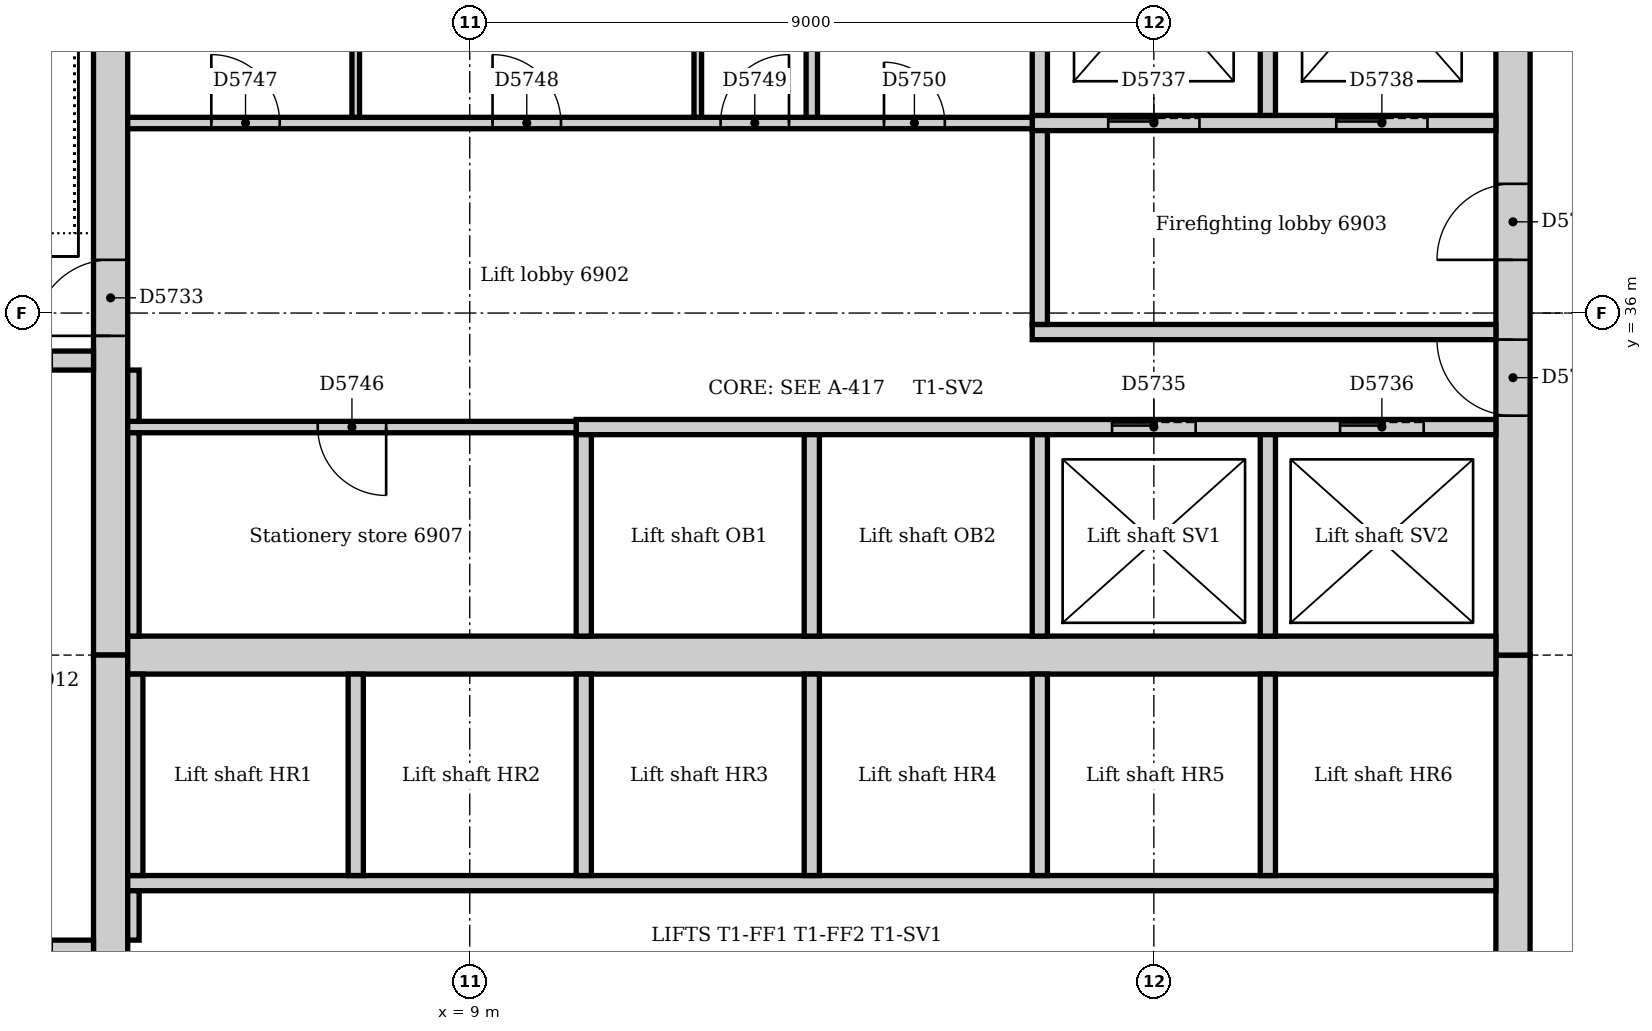
"""IFC4 building model, lengths in metres.
Left out: names, types, materials, properties, quantities, classifications, styles, units other than length and angle.
Written with IfcOpenShell. Run it as: python <this file> out.ifc"""

import sys

from ifc_helpers import new_model, si_unit, direction, frame, frame_2d, origin, place, context, subcontext, project, spatial, rectangle, extrude, element, fill, save


model = new_model("IFC4")
c1 = context("Model", 3, precision=1e-05, world=origin(), true_north=direction((0.0, 1.0)))
c2 = subcontext(c1, "Body", "Model", "MODEL_VIEW")
j1 = project(units=[si_unit("LENGTHUNIT", "METRE"), si_unit("PLANEANGLEUNIT", "RADIAN")], contexts=[c1])
p1 = place(None, origin())
s1 = spatial("IfcSite", under=j1, at=p1, CompositionType="ELEMENT")
p2 = place(p1, origin())
s2 = spatial("IfcBuilding", under=s1, at=p2, CompositionType="ELEMENT")
p3 = place(p2, frame((0.0, 0.0, 291.0)))
s3 = spatial("IfcBuildingStorey", under=s2, at=p3, CompositionType="ELEMENT", Elevation=291.0)
p4 = place(p3, frame((22.725, 21.0, 0.0), z_axis=(0.0, 0.0, 1.0), x_axis=(0.0, 1.0, 0.0)))
e1 = element("IfcWall", 1, at=p4, inside=s3, PredefinedType="SOLIDWALL", context=c2, shape_type="SweptSolid", body=[
    extrude(rectangle(XDim=10.5, YDim=0.45, at=frame_2d((5.25, 0.0))), origin(), (0.0, 0.0, 1.0), 6.55),
])
p5 = place(p4, frame((4.35, 0.0, 0.0)))
e2 = element("IfcOpeningElement", 2, at=p5, cuts=e1, PredefinedType="OPENING", context=c2, shape_type="SweptSolid", body=[
    extrude(rectangle(XDim=1.8, YDim=2.1, at=frame_2d((0.9, 1.05))), frame((0.0, 0.235, 0.0), z_axis=(0.0, -1.0, 0.0), x_axis=(1.0, 0.0, 0.0)), (0.0, 0.0, 1.0), 0.47),
])
p6 = place(p3, frame((22.725, 31.5, 0.0), z_axis=(0.0, 0.0, 1.0), x_axis=(0.0, 1.0, 0.0)))
e3 = element("IfcWall", 3, at=p6, inside=s3, PredefinedType="SOLIDWALL", context=c2, shape_type="SweptSolid", body=[
    extrude(rectangle(XDim=10.5, YDim=0.45, at=frame_2d((5.25, 0.0))), origin(), (0.0, 0.0, 1.0), 6.55),
])
p7 = place(p6, frame((3.15, 0.0, 0.0)))
e4 = element("IfcOpeningElement", 4, at=p7, cuts=e3, PredefinedType="OPENING", context=c2, shape_type="SweptSolid", body=[
    extrude(rectangle(XDim=1.0, YDim=2.1, at=frame_2d((0.5, 1.05))), frame((0.0, 0.235, 0.0), z_axis=(0.0, -1.0, 0.0), x_axis=(1.0, 0.0, 0.0)), (0.0, 0.0, 1.0), 0.47),
])
p8 = place(p6, frame((5.2, 0.0, 0.0)))
e5 = element("IfcOpeningElement", 5, at=p8, cuts=e3, PredefinedType="OPENING", context=c2, shape_type="SweptSolid", body=[
    extrude(rectangle(XDim=1.0, YDim=2.1, at=frame_2d((0.5, 1.05))), frame((0.0, 0.235, 0.0), z_axis=(0.0, -1.0, 0.0), x_axis=(1.0, 0.0, 0.0)), (0.0, 0.0, 1.0), 0.47),
])
p9 = place(p3, frame((4.275, 42.0, 0.0), z_axis=(0.0, 0.0, 1.0), x_axis=(0.0, -1.0, 0.0)))
e6 = element("IfcWall", 6, at=p9, inside=s3, PredefinedType="SOLIDWALL", context=c2, shape_type="SweptSolid", body=[
    extrude(rectangle(XDim=10.5, YDim=0.45, at=frame_2d((5.25, 0.0))), origin(), (0.0, 0.0, 1.0), 6.55),
])
p10 = place(p9, frame((5.3, 0.0, 0.0)))
e7 = element("IfcOpeningElement", 7, at=p10, cuts=e6, PredefinedType="OPENING", context=c2, shape_type="SweptSolid", body=[
    extrude(rectangle(XDim=1.0, YDim=2.1, at=frame_2d((0.5, 1.05))), frame((0.0, 0.235, 0.0), z_axis=(0.0, -1.0, 0.0), x_axis=(1.0, 0.0, 0.0)), (0.0, 0.0, 1.0), 0.47),
])
p11 = place(p3, frame((4.275, 31.5, 0.0), z_axis=(0.0, 0.0, 1.0), x_axis=(0.0, -1.0, 0.0)))
e8 = element("IfcWall", 8, at=p11, inside=s3, PredefinedType="SOLIDWALL", context=c2, shape_type="SweptSolid", body=[
    extrude(rectangle(XDim=10.5, YDim=0.45, at=frame_2d((5.25, 0.0))), origin(), (0.0, 0.0, 1.0), 6.55),
])
p12 = place(p11, frame((4.25, 0.0, 0.0)))
e9 = element("IfcOpeningElement", 9, at=p12, cuts=e8, PredefinedType="OPENING", context=c2, shape_type="SweptSolid", body=[
    extrude(rectangle(XDim=1.0, YDim=2.1, at=frame_2d((0.5, 1.05))), frame((0.0, 0.235, 0.0), z_axis=(0.0, -1.0, 0.0), x_axis=(1.0, 0.0, 0.0)), (0.0, 0.0, 1.0), 0.47),
])
p13 = place(p3, frame((4.5, 31.5, 0.0), z_axis=(0.0, 0.0, 1.0), x_axis=(1.0, 0.0, 0.0)))
e10 = element("IfcWall", 10, at=p13, inside=s3, PredefinedType="SOLIDWALL", context=c2, shape_type="SweptSolid", body=[
    extrude(rectangle(XDim=18.0, YDim=0.5, at=frame_2d((9.0, 0.0))), origin(), (0.0, 0.0, 1.0), 6.55),
])
p14 = place(p3, frame((4.05, 27.625, 0.0), z_axis=(0.0, 0.0, 1.0), x_axis=(-1.0, 0.0, 0.0)))
e11 = element("IfcWall", 11, at=p14, inside=s3, PredefinedType="SOLIDWALL", context=c2, shape_type="SweptSolid", body=[
    extrude(rectangle(XDim=3.69, YDim=0.25, at=frame_2d((1.845, 0.0))), origin(), (0.0, 0.0, 1.0), 6.55),
])
p15 = place(p14, frame((0.55, 0.0, 0.0)))
e12 = element("IfcOpeningElement", 12, at=p15, cuts=e11, PredefinedType="OPENING", context=c2, shape_type="SweptSolid", body=[
    extrude(rectangle(XDim=1.0, YDim=2.1, at=frame_2d((0.5, 1.05))), frame((0.0, 0.135, 0.0), z_axis=(0.0, -1.0, 0.0), x_axis=(1.0, 0.0, 0.0)), (0.0, 0.0, 1.0), 0.27),
])
p16 = place(p3, frame((0.36, 35.375, 0.0), z_axis=(0.0, 0.0, 1.0), x_axis=(1.0, 0.0, 0.0)))
e13 = element("IfcWall", 13, at=p16, inside=s3, PredefinedType="SOLIDWALL", context=c2, shape_type="SweptSolid", body=[
    extrude(rectangle(XDim=3.69, YDim=0.25, at=frame_2d((1.845, 0.0))), origin(), (0.0, 0.0, 1.0), 6.55),
])
p17 = place(p16, frame((2.14, 0.0, 0.0)))
e14 = element("IfcOpeningElement", 14, at=p17, cuts=e13, PredefinedType="OPENING", context=c2, shape_type="SweptSolid", body=[
    extrude(rectangle(XDim=1.0, YDim=2.1, at=frame_2d((0.5, 1.05))), frame((0.0, 0.135, 0.0), z_axis=(0.0, -1.0, 0.0), x_axis=(1.0, 0.0, 0.0)), (0.0, 0.0, 1.0), 0.27),
])
p18 = place(p3, frame((16.4, 35.75, 0.0), z_axis=(0.0, 0.0, 1.0), x_axis=(1.0, 0.0, 0.0)))
e15 = element("IfcWall", 15, at=p18, inside=s3, PredefinedType="PARTITIONING", context=c2, shape_type="SweptSolid", body=[
    extrude(rectangle(XDim=6.1, YDim=0.2, at=frame_2d((3.05, 0.0))), origin(), (0.0, 0.0, 1.0), 6.55),
])
p19 = place(p3, frame((16.4, 38.5, 0.0), z_axis=(0.0, 0.0, 1.0), x_axis=(1.0, 0.0, 0.0)))
e16 = element("IfcWall", 16, at=p19, inside=s3, PredefinedType="PARTITIONING", context=c2, shape_type="SweptSolid", body=[
    extrude(rectangle(XDim=6.1, YDim=0.2, at=frame_2d((3.05, 0.0))), origin(), (0.0, 0.0, 1.0), 6.55),
])
p20 = place(p19, frame((1.0, 0.0, 0.0)))
e17 = element("IfcOpeningElement", 17, at=p20, cuts=e16, PredefinedType="OPENING", context=c2, shape_type="SweptSolid", body=[
    extrude(rectangle(XDim=1.2, YDim=2.1, at=frame_2d((0.6, 1.05))), frame((0.0, 0.11, 0.0), z_axis=(0.0, -1.0, 0.0), x_axis=(1.0, 0.0, 0.0)), (0.0, 0.0, 1.0), 0.22),
])
p21 = place(p19, frame((4.0, 0.0, 0.0)))
e18 = element("IfcOpeningElement", 18, at=p21, cuts=e16, PredefinedType="OPENING", context=c2, shape_type="SweptSolid", body=[
    extrude(rectangle(XDim=1.2, YDim=2.1, at=frame_2d((0.6, 1.05))), frame((0.0, 0.11, 0.0), z_axis=(0.0, -1.0, 0.0), x_axis=(1.0, 0.0, 0.0)), (0.0, 0.0, 1.0), 0.22),
])
p22 = place(p3, frame((16.5, 35.85, 0.0), z_axis=(0.0, 0.0, 1.0), x_axis=(0.0, 1.0, 0.0)))
e19 = element("IfcWall", 19, at=p22, inside=s3, PredefinedType="PARTITIONING", context=c2, shape_type="SweptSolid", body=[
    extrude(rectangle(XDim=2.55, YDim=0.2, at=frame_2d((1.275, 0.0))), origin(), (0.0, 0.0, 1.0), 6.55),
])
p23 = place(p3, frame((4.5, 28.5, 0.0), z_axis=(0.0, 0.0, 1.0), x_axis=(1.0, 0.0, 0.0)))
e20 = element("IfcWall", 20, at=p23, inside=s3, PredefinedType="PARTITIONING", context=c2, shape_type="SweptSolid", body=[
    extrude(rectangle(XDim=18.0, YDim=0.2, at=frame_2d((9.0, 0.0))), origin(), (0.0, 0.0, 1.0), 6.55),
])
p24 = place(p3, frame((10.4, 34.5, 0.0), z_axis=(0.0, 0.0, 1.0), x_axis=(1.0, 0.0, 0.0)))
e21 = element("IfcWall", 21, at=p24, inside=s3, PredefinedType="PARTITIONING", context=c2, shape_type="SweptSolid", body=[
    extrude(rectangle(XDim=12.1, YDim=0.2, at=frame_2d((6.05, 0.0))), origin(), (0.0, 0.0, 1.0), 6.55),
])
p25 = place(p24, frame((7.05, 0.0, 0.0)))
e22 = element("IfcOpeningElement", 22, at=p25, cuts=e21, PredefinedType="OPENING", context=c2, shape_type="SweptSolid", body=[
    extrude(rectangle(XDim=1.1, YDim=2.1, at=frame_2d((0.55, 1.05))), frame((0.0, 0.11, 0.0), z_axis=(0.0, -1.0, 0.0), x_axis=(1.0, 0.0, 0.0)), (0.0, 0.0, 1.0), 0.22),
])
p26 = place(p24, frame((10.05, 0.0, 0.0)))
e23 = element("IfcOpeningElement", 23, at=p26, cuts=e21, PredefinedType="OPENING", context=c2, shape_type="SweptSolid", body=[
    extrude(rectangle(XDim=1.1, YDim=2.1, at=frame_2d((0.55, 1.05))), frame((0.0, 0.11, 0.0), z_axis=(0.0, -1.0, 0.0), x_axis=(1.0, 0.0, 0.0)), (0.0, 0.0, 1.0), 0.22),
])
for number, where, z_axis, x_axis in (
    (24, (10.5, 28.6, 0.0), (0.0, 0.0, 1.0), (0.0, 1.0, 0.0)),
    (25, (10.5, 31.75, 0.0), (0.0, 0.0, 1.0), (0.0, 1.0, 0.0)),
    (26, (13.5, 28.6, 0.0), (0.0, 0.0, 1.0), (0.0, 1.0, 0.0)),
    (27, (13.5, 31.75, 0.0), (0.0, 0.0, 1.0), (0.0, 1.0, 0.0)),
    (28, (16.5, 28.6, 0.0), (0.0, 0.0, 1.0), (0.0, 1.0, 0.0)),
    (29, (16.5, 31.75, 0.0), (0.0, 0.0, 1.0), (0.0, 1.0, 0.0)),
    (30, (19.5, 28.6, 0.0), (0.0, 0.0, 1.0), (0.0, 1.0, 0.0)),
    (31, (19.5, 31.75, 0.0), (0.0, 0.0, 1.0), (0.0, 1.0, 0.0)),
):
    element("IfcWall", number, at=place(p3, frame(where, z_axis=z_axis, x_axis=x_axis)), inside=s3, PredefinedType="PARTITIONING", context=c2, shape_type="SweptSolid", body=[
        extrude(rectangle(XDim=2.65, YDim=0.2, at=frame_2d((1.325, 0.0))), origin(), (0.0, 0.0, 1.0), 6.55),
    ])
for number, where, z_axis, x_axis in (
    (32, (16.5, 38.6, 0.0), (0.0, 0.0, 1.0), (0.0, 1.0, 0.0)),
    (33, (19.5, 38.6, 0.0), (0.0, 0.0, 1.0), (0.0, 1.0, 0.0)),
):
    element("IfcWall", number, at=place(p3, frame(where, z_axis=z_axis, x_axis=x_axis)), inside=s3, PredefinedType="PARTITIONING", context=c2, shape_type="SweptSolid", body=[
        extrude(rectangle(XDim=3.4, YDim=0.2, at=frame_2d((1.7, 0.0))), origin(), (0.0, 0.0, 1.0), 6.55),
    ])
for number, where, z_axis, x_axis in (
    (34, (4.6, 28.6, 0.0), (0.0, 0.0, 1.0), (0.0, 1.0, 0.0)),
    (35, (7.5, 28.6, 0.0), (0.0, 0.0, 1.0), (0.0, 1.0, 0.0)),
):
    element("IfcWall", number, at=place(p3, frame(where, z_axis=z_axis, x_axis=x_axis)), inside=s3, PredefinedType="PARTITIONING", context=c2, shape_type="SweptSolid", body=[
        extrude(rectangle(XDim=2.65, YDim=0.2, at=frame_2d((1.325, 0.0))), origin(), (0.0, 0.0, 1.0), 6.55),
    ])
p27 = place(p3, frame((4.5, 38.5, 0.0), z_axis=(0.0, 0.0, 1.0), x_axis=(1.0, 0.0, 0.0)))
e36 = element("IfcWall", 36, at=p27, inside=s3, PredefinedType="PARTITIONING", context=c2, shape_type="SweptSolid", body=[
    extrude(rectangle(XDim=11.9, YDim=0.15, at=frame_2d((5.95, 0.0))), origin(), (0.0, 0.0, 1.0), 6.55),
])
p28 = place(p27, frame((1.1, 0.0, 0.0)))
e37 = element("IfcOpeningElement", 37, at=p28, cuts=e36, PredefinedType="OPENING", context=c2, shape_type="SweptSolid", body=[
    extrude(rectangle(XDim=0.9, YDim=2.1, at=frame_2d((0.45, 1.05))), frame((0.0, 0.085, 0.0), z_axis=(0.0, -1.0, 0.0), x_axis=(1.0, 0.0, 0.0)), (0.0, 0.0, 1.0), 0.17),
])
p29 = place(p27, frame((4.8, 0.0, 0.0)))
e38 = element("IfcOpeningElement", 38, at=p29, cuts=e36, PredefinedType="OPENING", context=c2, shape_type="SweptSolid", body=[
    extrude(rectangle(XDim=0.9, YDim=2.1, at=frame_2d((0.45, 1.05))), frame((0.0, 0.085, 0.0), z_axis=(0.0, -1.0, 0.0), x_axis=(1.0, 0.0, 0.0)), (0.0, 0.0, 1.0), 0.17),
])
p30 = place(p27, frame((7.8, 0.0, 0.0)))
e39 = element("IfcOpeningElement", 39, at=p30, cuts=e36, PredefinedType="OPENING", context=c2, shape_type="SweptSolid", body=[
    extrude(rectangle(XDim=0.9, YDim=2.1, at=frame_2d((0.45, 1.05))), frame((0.0, 0.085, 0.0), z_axis=(0.0, -1.0, 0.0), x_axis=(1.0, 0.0, 0.0)), (0.0, 0.0, 1.0), 0.17),
])
p31 = place(p27, frame((9.95, 0.0, 0.0)))
e40 = element("IfcOpeningElement", 40, at=p31, cuts=e36, PredefinedType="OPENING", context=c2, shape_type="SweptSolid", body=[
    extrude(rectangle(XDim=0.8, YDim=2.1, at=frame_2d((0.4, 1.05))), frame((0.0, 0.085, 0.0), z_axis=(0.0, -1.0, 0.0), x_axis=(1.0, 0.0, 0.0)), (0.0, 0.0, 1.0), 0.17),
])
p32 = place(p3, frame((4.5, 34.5, 0.0), z_axis=(0.0, 0.0, 1.0), x_axis=(1.0, 0.0, 0.0)))
e41 = element("IfcWall", 41, at=p32, inside=s3, PredefinedType="PARTITIONING", context=c2, shape_type="SweptSolid", body=[
    extrude(rectangle(XDim=5.9, YDim=0.15, at=frame_2d((2.95, 0.0))), origin(), (0.0, 0.0, 1.0), 6.55),
])
p33 = place(p32, frame((2.5, 0.0, 0.0)))
e42 = element("IfcOpeningElement", 42, at=p33, cuts=e41, PredefinedType="OPENING", context=c2, shape_type="SweptSolid", body=[
    extrude(rectangle(XDim=0.9, YDim=2.1, at=frame_2d((0.45, 1.05))), frame((0.0, 0.085, 0.0), z_axis=(0.0, -1.0, 0.0), x_axis=(1.0, 0.0, 0.0)), (0.0, 0.0, 1.0), 0.17),
])
p34 = place(p3, frame((4.575, 34.575, 0.0), z_axis=(0.0, 0.0, 1.0), x_axis=(0.0, 1.0, 0.0)))
e43 = element("IfcWall", 43, at=p34, inside=s3, PredefinedType="PARTITIONING", context=c2, shape_type="SweptSolid", body=[
    extrude(rectangle(XDim=0.675, YDim=0.15, at=frame_2d((0.338, 0.0))), origin(), (0.0, 0.0, 1.0), 6.55),
])
p35 = place(p3, frame((4.575, 31.75, 0.0), z_axis=(0.0, 0.0, 1.0), x_axis=(0.0, 1.0, 0.0)))
e44 = element("IfcWall", 44, at=p35, inside=s3, PredefinedType="PARTITIONING", context=c2, shape_type="SweptSolid", body=[
    extrude(rectangle(XDim=2.675, YDim=0.15, at=frame_2d((1.337, 0.0))), origin(), (0.0, 0.0, 1.0), 6.55),
])
p36 = place(p3, frame((4.575, 27.75, 0.0), z_axis=(0.0, 0.0, 1.0), x_axis=(0.0, 1.0, 0.0)))
e45 = element("IfcWall", 45, at=p36, inside=s3, PredefinedType="PARTITIONING", context=c2, shape_type="SweptSolid", body=[
    extrude(rectangle(XDim=0.65, YDim=0.15, at=frame_2d((0.325, 0.0))), origin(), (0.0, 0.0, 1.0), 6.55),
])
p37 = place(p3, frame((13.5, 38.575, 0.0), z_axis=(0.0, 0.0, 1.0), x_axis=(0.0, 1.0, 0.0)))
e46 = element("IfcWall", 46, at=p37, inside=s3, PredefinedType="PARTITIONING", context=c2, shape_type="SweptSolid", body=[
    extrude(rectangle(XDim=3.425, YDim=0.15, at=frame_2d((1.712, 0.0))), origin(), (0.0, 0.0, 1.0), 6.55),
])
for number, where, z_axis, x_axis in (
    (47, (7.5, 38.575, 0.0), (0.0, 0.0, 1.0), (0.0, 1.0, 0.0)),
    (48, (12.0, 38.575, 0.0), (0.0, 0.0, 1.0), (0.0, 1.0, 0.0)),
):
    element("IfcWall", number, at=place(p3, frame(where, z_axis=z_axis, x_axis=x_axis)), inside=s3, PredefinedType="PARTITIONING", context=c2, shape_type="SweptSolid", body=[
        extrude(rectangle(XDim=3.425, YDim=0.1, at=frame_2d((1.712, 0.0))), origin(), (0.0, 0.0, 1.0), 6.55),
    ])
p38 = place(p10, frame((1.0, 0.0, 0.0), z_axis=(0.0, 0.0, 1.0), x_axis=(-1.0, 0.0, 0.0)))
e49 = element("IfcDoor", 49, at=p38, inside=s3, OperationType="SINGLE_SWING_LEFT", PredefinedType="DOOR", context=c2, shape_type="SweptSolid", body=[
    extrude(rectangle(XDim=1.0, YDim=2.1, at=frame_2d((0.5, 1.05))), frame((0.0, 0.025, 0.0), z_axis=(0.0, -1.0, 0.0), x_axis=(1.0, 0.0, 0.0)), (0.0, 0.0, 1.0), 0.05),
])
fill(e7, e49)
p39 = place(p25, origin())
e50 = element("IfcDoor", 50, at=p39, inside=s3, OperationType="SLIDING_TO_LEFT", PredefinedType="DOOR", context=c2, shape_type="SweptSolid", body=[
    extrude(rectangle(XDim=1.1, YDim=2.1, at=frame_2d((0.55, 1.05))), frame((0.0, 0.025, 0.0), z_axis=(0.0, -1.0, 0.0), x_axis=(1.0, 0.0, 0.0)), (0.0, 0.0, 1.0), 0.05),
])
fill(e22, e50)
p40 = place(p26, origin())
e51 = element("IfcDoor", 51, at=p40, inside=s3, OperationType="SLIDING_TO_LEFT", PredefinedType="DOOR", context=c2, shape_type="SweptSolid", body=[
    extrude(rectangle(XDim=1.1, YDim=2.1, at=frame_2d((0.55, 1.05))), frame((0.0, 0.025, 0.0), z_axis=(0.0, -1.0, 0.0), x_axis=(1.0, 0.0, 0.0)), (0.0, 0.0, 1.0), 0.05),
])
fill(e23, e51)
p41 = place(p20, origin())
e52 = element("IfcDoor", 52, at=p41, inside=s3, OperationType="SLIDING_TO_LEFT", PredefinedType="DOOR", context=c2, shape_type="SweptSolid", body=[
    extrude(rectangle(XDim=1.2, YDim=2.1, at=frame_2d((0.6, 1.05))), frame((0.0, 0.025, 0.0), z_axis=(0.0, -1.0, 0.0), x_axis=(1.0, 0.0, 0.0)), (0.0, 0.0, 1.0), 0.05),
])
fill(e17, e52)
p42 = place(p21, origin())
e53 = element("IfcDoor", 53, at=p42, inside=s3, OperationType="SLIDING_TO_LEFT", PredefinedType="DOOR", context=c2, shape_type="SweptSolid", body=[
    extrude(rectangle(XDim=1.2, YDim=2.1, at=frame_2d((0.6, 1.05))), frame((0.0, 0.025, 0.0), z_axis=(0.0, -1.0, 0.0), x_axis=(1.0, 0.0, 0.0)), (0.0, 0.0, 1.0), 0.05),
])
fill(e18, e53)
p43 = place(p7, origin())
e54 = element("IfcDoor", 54, at=p43, inside=s3, OperationType="SINGLE_SWING_RIGHT", PredefinedType="DOOR", context=c2, shape_type="SweptSolid", body=[
    extrude(rectangle(XDim=1.0, YDim=2.1, at=frame_2d((0.5, 1.05))), frame((0.0, 0.025, 0.0), z_axis=(0.0, -1.0, 0.0), x_axis=(1.0, 0.0, 0.0)), (0.0, 0.0, 1.0), 0.05),
])
fill(e4, e54)
p44 = place(p8, origin())
e55 = element("IfcDoor", 55, at=p44, inside=s3, OperationType="SINGLE_SWING_LEFT", PredefinedType="DOOR", context=c2, shape_type="SweptSolid", body=[
    extrude(rectangle(XDim=1.0, YDim=2.1, at=frame_2d((0.5, 1.05))), frame((0.0, 0.025, 0.0), z_axis=(0.0, -1.0, 0.0), x_axis=(1.0, 0.0, 0.0)), (0.0, 0.0, 1.0), 0.05),
])
fill(e5, e55)
p45 = place(p33, frame((0.9, 0.0, 0.0), z_axis=(0.0, 0.0, 1.0), x_axis=(-1.0, 0.0, 0.0)))
e56 = element("IfcDoor", 56, at=p45, inside=s3, OperationType="SINGLE_SWING_LEFT", PredefinedType="DOOR", context=c2, shape_type="SweptSolid", body=[
    extrude(rectangle(XDim=0.9, YDim=2.1, at=frame_2d((0.45, 1.05))), frame((0.0, 0.025, 0.0), z_axis=(0.0, -1.0, 0.0), x_axis=(1.0, 0.0, 0.0)), (0.0, 0.0, 1.0), 0.05),
])
fill(e42, e56)
p46 = place(p28, origin())
e57 = element("IfcDoor", 57, at=p46, inside=s3, OperationType="SINGLE_SWING_LEFT", PredefinedType="DOOR", context=c2, shape_type="SweptSolid", body=[
    extrude(rectangle(XDim=0.9, YDim=2.1, at=frame_2d((0.45, 1.05))), frame((0.0, 0.025, 0.0), z_axis=(0.0, -1.0, 0.0), x_axis=(1.0, 0.0, 0.0)), (0.0, 0.0, 1.0), 0.05),
])
fill(e37, e57)
p47 = place(p29, origin())
e58 = element("IfcDoor", 58, at=p47, inside=s3, OperationType="SINGLE_SWING_LEFT", PredefinedType="DOOR", context=c2, shape_type="SweptSolid", body=[
    extrude(rectangle(XDim=0.9, YDim=2.1, at=frame_2d((0.45, 1.05))), frame((0.0, 0.025, 0.0), z_axis=(0.0, -1.0, 0.0), x_axis=(1.0, 0.0, 0.0)), (0.0, 0.0, 1.0), 0.05),
])
fill(e38, e58)
p48 = place(p30, origin())
e59 = element("IfcDoor", 59, at=p48, inside=s3, OperationType="SINGLE_SWING_RIGHT", PredefinedType="DOOR", context=c2, shape_type="SweptSolid", body=[
    extrude(rectangle(XDim=0.9, YDim=2.1, at=frame_2d((0.45, 1.05))), frame((0.0, 0.025, 0.0), z_axis=(0.0, -1.0, 0.0), x_axis=(1.0, 0.0, 0.0)), (0.0, 0.0, 1.0), 0.05),
])
fill(e39, e59)
p49 = place(p31, origin())
e60 = element("IfcDoor", 60, at=p49, inside=s3, OperationType="SINGLE_SWING_LEFT", PredefinedType="DOOR", context=c2, shape_type="SweptSolid", body=[
    extrude(rectangle(XDim=0.8, YDim=2.1, at=frame_2d((0.4, 1.05))), frame((0.0, 0.025, 0.0), z_axis=(0.0, -1.0, 0.0), x_axis=(1.0, 0.0, 0.0)), (0.0, 0.0, 1.0), 0.05),
])
fill(e40, e60)
save(model, sys.argv[1])
